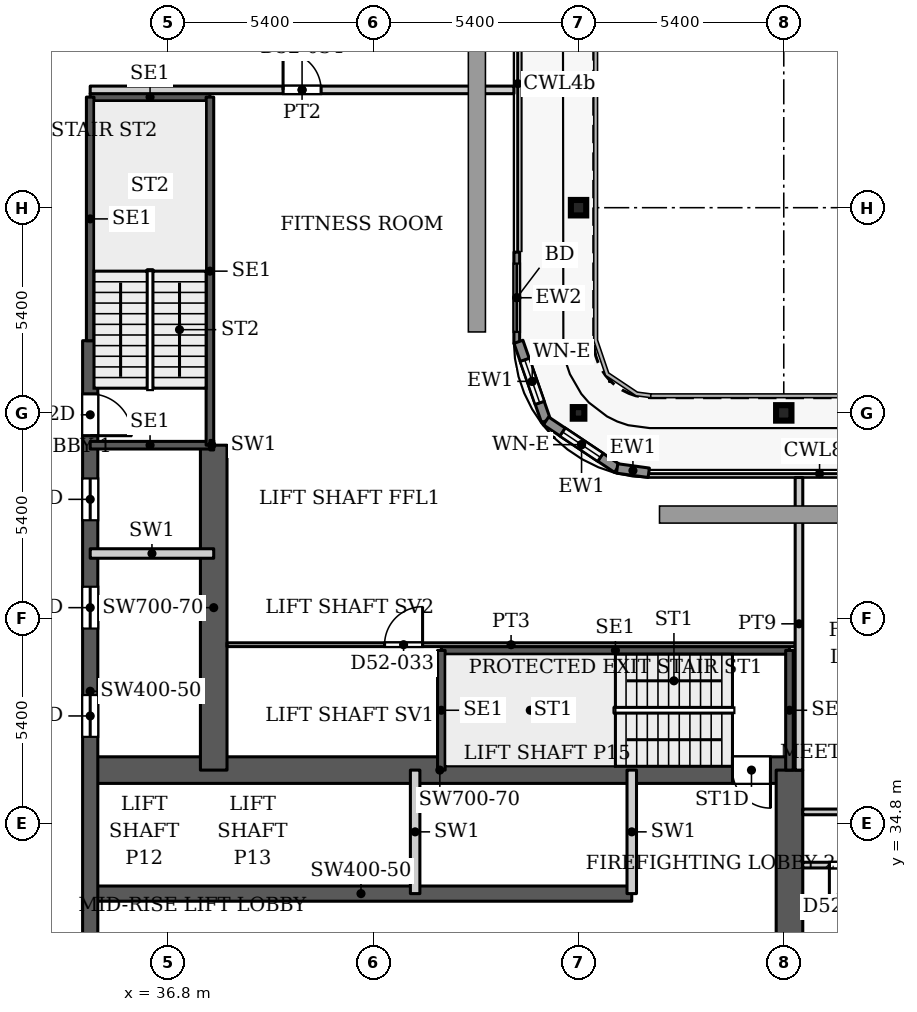
"""IFC4 building model, lengths in metres.
Left out: names, types, materials, properties, quantities, classifications, styles, units other than length and angle.
Written with IfcOpenShell. Run it as: python <this file> out.ifc"""

import sys

from ifc_helpers import new_model, si_unit, direction, frame, frame_2d, origin, origin_2d, place, context, subcontext, project, spatial, rectangle, hollow_rectangle, i_section, extrude, source, transform, mapped, element, fill, save


model = new_model("IFC4")
c1 = context("Model", 3, precision=1e-05, world=origin(), true_north=direction((0.0, 1.0)))
c2 = subcontext(c1, "Body", "Model", "MODEL_VIEW")
j1 = project(units=[si_unit("LENGTHUNIT", "METRE"), si_unit("PLANEANGLEUNIT", "RADIAN")], contexts=[c1])
p1 = place(None, origin())
s1 = spatial("IfcSite", under=j1, at=p1, CompositionType="ELEMENT")
p2 = place(p1, origin())
s2 = spatial("IfcBuilding", under=s1, at=p2, CompositionType="ELEMENT")
p3 = place(p2, frame((0.0, 0.0, 227.9)))
s3 = spatial("IfcBuildingStorey", under=s2, at=p3, CompositionType="ELEMENT", Elevation=227.9)
for number, where, z_axis, x_axis in (
    (1, (53.0, 45.6, 0.0), (0.0, 0.0, 1.0), (1.0, 0.0, 0.0)),
    (2, (47.6, 51.0, 0.0), (0.0, 0.0, 1.0), (1.0, 0.0, 0.0)),
):
    element("IfcColumn", number, at=place(p3, frame(where, z_axis=z_axis, x_axis=x_axis)), inside=s3, PredefinedType="COLUMN", context=c2, shape_type="SweptSolid", body=[
        extrude(i_section(OverallWidth=0.404, OverallDepth=0.407, WebThickness=0.027, FlangeThickness=0.044, FilletRadius=0.012, at=origin_2d()), origin(), (0.0, 0.0, 1.0), 3.9),
    ])
p4 = place(p3, frame((47.6, 45.6, 0.0), z_axis=(0.0, 0.0, 1.0), x_axis=(1.0, 0.0, 0.0)))
e3 = element("IfcColumn", 3, at=p4, inside=s3, PredefinedType="COLUMN", context=c2, shape_type="SweptSolid", body=[
    extrude(hollow_rectangle(XDim=0.305, YDim=0.305, WallThickness=0.016, InnerFilletRadius=0.016, OuterFilletRadius=0.032, at=origin_2d()), origin(), (0.0, 0.0, 1.0), 3.9),
])
p5 = place(p3, frame((34.75, 32.95, 0.0), z_axis=(0.0, 0.0, 1.0), x_axis=(1.0, 0.0, 0.0)))
e4 = element("IfcWall", 4, at=p5, inside=s3, PredefinedType="SHEAR", context=c2, shape_type="SweptSolid", body=[
    extrude(rectangle(XDim=14.25, YDim=0.4, at=frame_2d((7.125, 0.0))), origin(), (0.0, 0.0, 1.0), 3.9),
])
p6 = place(p3, frame((34.75, 36.2, 0.0), z_axis=(0.0, 0.0, 1.0), x_axis=(1.0, 0.0, 0.0)))
e5 = element("IfcWall", 5, at=p6, inside=s3, PredefinedType="SHEAR", context=c2, shape_type="SweptSolid", body=[
    extrude(rectangle(XDim=18.4, YDim=0.7, at=frame_2d((9.2, 0.0))), origin(), (0.0, 0.0, 1.0), 3.9),
])
p7 = place(p6, frame((16.9, 0.0, 0.0)))
e6 = element("IfcOpeningElement", 6, at=p7, cuts=e5, PredefinedType="OPENING", context=c2, shape_type="SweptSolid", body=[
    extrude(rectangle(XDim=1.0, YDim=2.2, at=frame_2d((0.5, 1.1))), frame((0.0, 0.36, 0.0), z_axis=(0.0, -1.0, 0.0), x_axis=(1.0, 0.0, 0.0)), (0.0, 0.0, 1.0), 0.72),
])
p8 = place(p3, frame((34.75, 29.05, 0.0), z_axis=(0.0, 0.0, 1.0), x_axis=(0.0, 1.0, 0.0)))
e7 = element("IfcWall", 7, at=p8, inside=s3, PredefinedType="SHEAR", context=c2, shape_type="SweptSolid", body=[
    extrude(rectangle(XDim=18.45, YDim=0.4, at=frame_2d((9.225, 0.0))), origin(), (0.0, 0.0, 1.0), 3.9),
])
p9 = place(p8, frame((8.025, 0.0, 0.0)))
e8 = element("IfcOpeningElement", 8, at=p9, cuts=e7, PredefinedType="OPENING", context=c2, shape_type="SweptSolid", body=[
    extrude(rectangle(XDim=1.1, YDim=2.2, at=frame_2d((0.55, 1.1))), frame((0.0, 0.21, 0.0), z_axis=(0.0, -1.0, 0.0), x_axis=(1.0, 0.0, 0.0)), (0.0, 0.0, 1.0), 0.42),
])
p10 = place(p8, frame((10.875, 0.0, 0.0)))
e9 = element("IfcOpeningElement", 9, at=p10, cuts=e7, PredefinedType="OPENING", context=c2, shape_type="SweptSolid", body=[
    extrude(rectangle(XDim=1.1, YDim=2.2, at=frame_2d((0.55, 1.1))), frame((0.0, 0.21, 0.0), z_axis=(0.0, -1.0, 0.0), x_axis=(1.0, 0.0, 0.0)), (0.0, 0.0, 1.0), 0.42),
])
p11 = place(p8, frame((13.725, 0.0, 0.0)))
e10 = element("IfcOpeningElement", 10, at=p11, cuts=e7, PredefinedType="OPENING", context=c2, shape_type="SweptSolid", body=[
    extrude(rectangle(XDim=1.1, YDim=2.2, at=frame_2d((0.55, 1.1))), frame((0.0, 0.21, 0.0), z_axis=(0.0, -1.0, 0.0), x_axis=(1.0, 0.0, 0.0)), (0.0, 0.0, 1.0), 0.42),
])
p12 = place(p8, frame((15.95, 0.0, 0.0)))
e11 = element("IfcOpeningElement", 11, at=p12, cuts=e7, PredefinedType="OPENING", context=c2, shape_type="SweptSolid", body=[
    extrude(rectangle(XDim=1.1, YDim=2.2, at=frame_2d((0.55, 1.1))), frame((0.0, 0.21, 0.0), z_axis=(0.0, -1.0, 0.0), x_axis=(1.0, 0.0, 0.0)), (0.0, 0.0, 1.0), 0.42),
])
p13 = place(p3, frame((38.0, 36.2, 0.0), z_axis=(0.0, 0.0, 1.0), x_axis=(0.0, 1.0, 0.0)))
e12 = element("IfcWall", 12, at=p13, inside=s3, PredefinedType="SHEAR", context=c2, shape_type="SweptSolid", body=[
    extrude(rectangle(XDim=8.55, YDim=0.7, at=frame_2d((4.275, 0.0))), origin(), (0.0, 0.0, 1.0), 3.9),
])
p14 = place(p3, frame((53.15, 25.8, 0.0), z_axis=(0.0, 0.0, 1.0), x_axis=(0.0, 1.0, 0.0)))
e13 = element("IfcWall", 13, at=p14, inside=s3, PredefinedType="SHEAR", context=c2, shape_type="SweptSolid", body=[
    extrude(rectangle(XDim=10.4, YDim=0.7, at=frame_2d((5.2, 0.0))), origin(), (0.0, 0.0, 1.0), 3.9),
])
p15 = place(p3, frame((45.975, 49.83, 0.0), z_axis=(0.0, 0.0, 1.0), x_axis=(0.0, -1.0, 0.0)))
e14 = element("IfcWall", 14, at=p15, inside=s3, PredefinedType="SOLIDWALL", context=c2, shape_type="SweptSolid", body=[
    extrude(rectangle(XDim=2.4, YDim=0.15, at=frame_2d((1.2, 0.0))), origin(), (0.0, 0.0, 1.0), 3.75),
])
p16 = place(p15, frame((0.3, 0.0, 0.0)))
e15 = element("IfcOpeningElement", 15, at=p16, cuts=e14, PredefinedType="OPENING", context=c2, shape_type="SweptSolid", body=[
    extrude(rectangle(XDim=1.8, YDim=2.4, at=frame_2d((0.9, 1.2))), frame((0.0, 0.085, 0.0), z_axis=(0.0, -1.0, 0.0), x_axis=(1.0, 0.0, 0.0)), (0.0, 0.0, 1.0), 0.17),
])
p17 = place(p3, frame((46.018, 47.471, 0.0), z_axis=(0.0, 0.0, 1.0), x_axis=(0.328791208903, -0.944402637093, 0.0)))
e16 = element("IfcWall", 16, at=p17, inside=s3, PredefinedType="SOLIDWALL", context=c2, shape_type="SweptSolid", body=[
    extrude(rectangle(XDim=2.205, YDim=0.25, at=frame_2d((1.102, 0.0))), origin(), (0.0, 0.0, 1.0), 3.75),
])
p18 = place(p17, frame((0.503, 0.0, 0.6)))
e17 = element("IfcOpeningElement", 17, at=p18, cuts=e16, PredefinedType="OPENING", context=c2, shape_type="SweptSolid", body=[
    extrude(rectangle(XDim=1.2, YDim=2.1, at=frame_2d((0.6, 1.05))), frame((0.0, 0.135, 0.0), z_axis=(0.0, -1.0, 0.0), x_axis=(1.0, 0.0, 0.0)), (0.0, 0.0, 1.0), 0.27),
])
p19 = place(p3, frame((46.743, 45.389, 0.0), z_axis=(0.0, 0.0, 1.0), x_axis=(0.831449265529, -0.555600682912, 0.0)))
e18 = element("IfcWall", 18, at=p19, inside=s3, PredefinedType="SOLIDWALL", context=c2, shape_type="SweptSolid", body=[
    extrude(rectangle(XDim=2.251, YDim=0.25, at=frame_2d((1.126, 0.0))), origin(), (0.0, 0.0, 1.0), 3.75),
])
p20 = place(p19, frame((0.525, 0.0, 0.6)))
e19 = element("IfcOpeningElement", 19, at=p20, cuts=e18, PredefinedType="OPENING", context=c2, shape_type="SweptSolid", body=[
    extrude(rectangle(XDim=1.2, YDim=2.1, at=frame_2d((0.6, 1.05))), frame((0.0, 0.135, 0.0), z_axis=(0.0, -1.0, 0.0), x_axis=(1.0, 0.0, 0.0)), (0.0, 0.0, 1.0), 0.27),
])
p21 = place(p3, frame((48.615, 44.138, 0.0), z_axis=(0.0, 0.0, 1.0), x_axis=(0.990741504246, -0.135761819977, 0.0)))
e20 = element("IfcWall", 20, at=p21, inside=s3, PredefinedType="SOLIDWALL", context=c2, shape_type="SweptSolid", body=[
    extrude(rectangle(XDim=0.84, YDim=0.25, at=frame_2d((0.42, 0.0))), origin(), (0.0, 0.0, 1.0), 3.75),
])
p22 = place(p3, frame((43.99, 39.35, 0.0), z_axis=(0.0, 0.0, 1.0), x_axis=(1.0, 0.0, 0.0)))
e21 = element("IfcWall", 21, at=p22, inside=s3, PredefinedType="SHEAR", context=c2, shape_type="SweptSolid", body=[
    extrude(rectangle(XDim=9.16, YDim=0.2, at=frame_2d((4.58, 0.0))), origin(), (0.0, 0.0, 1.0), 3.9),
])
for number, where, z_axis, x_axis in (
    (22, (43.99, 36.2, 0.0), (0.0, 0.0, 1.0), (0.0, 1.0, 0.0)),
    (23, (53.15, 36.2, 0.0), (0.0, 0.0, 1.0), (0.0, 1.0, 0.0)),
):
    element("IfcWall", number, at=place(p3, frame(where, z_axis=z_axis, x_axis=x_axis)), inside=s3, PredefinedType="SHEAR", context=c2, shape_type="SweptSolid", body=[
        extrude(rectangle(XDim=3.15, YDim=0.2, at=frame_2d((1.575, 0.0))), origin(), (0.0, 0.0, 1.0), 3.9),
    ])
for number, where, z_axis, x_axis in (
    (24, (34.75, 44.75, 0.0), (0.0, 0.0, 1.0), (1.0, 0.0, 0.0)),
    (25, (34.75, 53.91, 0.0), (0.0, 0.0, 1.0), (1.0, 0.0, 0.0)),
):
    element("IfcWall", number, at=place(p3, frame(where, z_axis=z_axis, x_axis=x_axis)), inside=s3, PredefinedType="SHEAR", context=c2, shape_type="SweptSolid", body=[
        extrude(rectangle(XDim=3.15, YDim=0.2, at=frame_2d((1.575, 0.0))), origin(), (0.0, 0.0, 1.0), 3.9),
    ])
p23 = place(p3, frame((34.75, 47.5, 0.0), z_axis=(0.0, 0.0, 1.0), x_axis=(0.0, 1.0, 0.0)))
e26 = element("IfcWall", 26, at=p23, inside=s3, PredefinedType="SHEAR", context=c2, shape_type="SweptSolid", body=[
    extrude(rectangle(XDim=6.41, YDim=0.2, at=frame_2d((3.205, 0.0))), origin(), (0.0, 0.0, 1.0), 3.9),
])
p24 = place(p3, frame((37.9, 44.75, 0.0), z_axis=(0.0, 0.0, 1.0), x_axis=(0.0, 1.0, 0.0)))
e27 = element("IfcWall", 27, at=p24, inside=s3, PredefinedType="SHEAR", context=c2, shape_type="SweptSolid", body=[
    extrude(rectangle(XDim=9.16, YDim=0.2, at=frame_2d((4.58, 0.0))), origin(), (0.0, 0.0, 1.0), 3.9),
])
for number, where, z_axis, x_axis in (
    (28, (43.3, 32.95, 0.0), (0.0, 0.0, 1.0), (0.0, 1.0, 0.0)),
    (29, (49.0, 32.95, 0.0), (0.0, 0.0, 1.0), (0.0, 1.0, 0.0)),
    (30, (34.75, 41.9, 0.0), (0.0, 0.0, 1.0), (1.0, 0.0, 0.0)),
):
    element("IfcWall", number, at=place(p3, frame(where, z_axis=z_axis, x_axis=x_axis)), inside=s3, PredefinedType="PARTITIONING", context=c2, shape_type="SweptSolid", body=[
        extrude(rectangle(XDim=3.25, YDim=0.25, at=frame_2d((1.625, 0.0))), origin(), (0.0, 0.0, 1.0), 3.9),
    ])
p25 = place(p3, frame((37.9, 44.75, 0.0), z_axis=(0.0, 0.0, 1.0), x_axis=(1.0, 0.0, 0.0)))
e31 = element("IfcWall", 31, at=p25, inside=s3, PredefinedType="PARTITIONING", context=c2, shape_type="SweptSolid", body=[
    extrude(rectangle(XDim=0.1, YDim=0.25, at=frame_2d((0.05, 0.0))), origin(), (0.0, 0.0, 1.0), 3.9),
])
p26 = place(p3, frame((34.75, 54.1, 0.0), z_axis=(0.0, 0.0, 1.0), x_axis=(1.0, 0.0, 0.0)))
e32 = element("IfcWall", 32, at=p26, inside=s3, PredefinedType="PARTITIONING", context=c2, shape_type="SweptSolid", body=[
    extrude(rectangle(XDim=11.15, YDim=0.2, at=frame_2d((5.575, 0.0))), origin(), (0.0, 0.0, 1.0), 3.6),
])
p27 = place(p26, frame((5.075, 0.0, 0.0)))
e33 = element("IfcOpeningElement", 33, at=p27, cuts=e32, PredefinedType="OPENING", context=c2, shape_type="SweptSolid", body=[
    extrude(rectangle(XDim=1.0, YDim=2.1, at=frame_2d((0.5, 1.05))), frame((0.0, 0.11, 0.0), z_axis=(0.0, -1.0, 0.0), x_axis=(1.0, 0.0, 0.0)), (0.0, 0.0, 1.0), 0.22),
])
p28 = place(p3, frame((38.349, 39.5, 0.0), z_axis=(0.0, 0.0, 1.0), x_axis=(1.0, 0.0, 0.0)))
e34 = element("IfcWall", 34, at=p28, inside=s3, PredefinedType="PARTITIONING", context=c2, shape_type="SweptSolid", body=[
    extrude(rectangle(XDim=14.951, YDim=0.1, at=frame_2d((7.476, 0.0))), origin(), (0.0, 0.0, 1.0), 3.6),
])
p29 = place(p28, frame((4.147, 0.0, 0.0)))
e35 = element("IfcOpeningElement", 35, at=p29, cuts=e34, PredefinedType="OPENING", context=c2, shape_type="SweptSolid", body=[
    extrude(rectangle(XDim=1.0, YDim=2.1, at=frame_2d((0.5, 1.05))), frame((0.0, 0.06, 0.0), z_axis=(0.0, -1.0, 0.0), x_axis=(1.0, 0.0, 0.0)), (0.0, 0.0, 1.0), 0.12),
])
p30 = place(p3, frame((53.4, 36.199, 0.0), z_axis=(0.0, 0.0, 1.0), x_axis=(0.0, 1.0, 0.0)))
e36 = element("IfcWall", 36, at=p30, inside=s3, PredefinedType="PARTITIONING", context=c2, shape_type="SweptSolid", body=[
    extrude(rectangle(XDim=7.701, YDim=0.2, at=frame_2d((3.851, 0.0))), origin(), (0.0, 0.0, 1.0), 3.6),
])
p31 = place(p3, frame((53.499, 33.7, 0.0), z_axis=(0.0, 0.0, 1.0), x_axis=(1.0, 0.0, 0.0)))
e37 = element("IfcWall", 37, at=p31, inside=s3, PredefinedType="PARTITIONING", context=c2, shape_type="SweptSolid", body=[
    extrude(rectangle(XDim=17.076, YDim=0.15, at=frame_2d((8.538, 0.0))), origin(), (0.0, 0.0, 1.0), 3.6),
])
p32 = place(p31, frame((10.151, 0.0, 0.0)))
e38 = element("IfcOpeningElement", 38, at=p32, cuts=e37, PredefinedType="OPENING", context=c2, shape_type="SweptSolid", body=[
    extrude(rectangle(XDim=0.8, YDim=2.1, at=frame_2d((0.4, 1.05))), frame((0.0, 0.085, 0.0), z_axis=(0.0, -1.0, 0.0), x_axis=(1.0, 0.0, 0.0)), (0.0, 0.0, 1.0), 0.17),
])
p33 = place(p31, frame((14.651, 0.0, 0.0)))
e39 = element("IfcOpeningElement", 39, at=p33, cuts=e37, PredefinedType="OPENING", context=c2, shape_type="SweptSolid", body=[
    extrude(rectangle(XDim=0.8, YDim=2.1, at=frame_2d((0.4, 1.05))), frame((0.0, 0.085, 0.0), z_axis=(0.0, -1.0, 0.0), x_axis=(1.0, 0.0, 0.0)), (0.0, 0.0, 1.0), 0.17),
])
p34 = place(p31, frame((7.451, 0.0, 0.0)))
e40 = element("IfcOpeningElement", 40, at=p34, cuts=e37, PredefinedType="OPENING", context=c2, shape_type="SweptSolid", body=[
    extrude(rectangle(XDim=0.8, YDim=2.1, at=frame_2d((0.4, 1.05))), frame((0.0, 0.085, 0.0), z_axis=(0.0, -1.0, 0.0), x_axis=(1.0, 0.0, 0.0)), (0.0, 0.0, 1.0), 0.17),
])
p35 = place(p31, frame((3.851, 0.0, 0.0)))
e41 = element("IfcOpeningElement", 41, at=p35, cuts=e37, PredefinedType="OPENING", context=c2, shape_type="SweptSolid", body=[
    extrude(rectangle(XDim=0.9, YDim=2.1, at=frame_2d((0.45, 1.05))), frame((0.0, 0.085, 0.0), z_axis=(0.0, -1.0, 0.0), x_axis=(1.0, 0.0, 0.0)), (0.0, 0.0, 1.0), 0.17),
])
p36 = place(p31, frame((0.701, 0.0, 0.0)))
e42 = element("IfcOpeningElement", 42, at=p36, cuts=e37, PredefinedType="OPENING", context=c2, shape_type="SweptSolid", body=[
    extrude(rectangle(XDim=0.8, YDim=2.1, at=frame_2d((0.4, 1.05))), frame((0.0, 0.085, 0.0), z_axis=(0.0, -1.0, 0.0), x_axis=(1.0, 0.0, 0.0)), (0.0, 0.0, 1.0), 0.17),
])
p37 = place(p31, frame((12.701, 0.0, 0.0)))
e43 = element("IfcOpeningElement", 43, at=p37, cuts=e37, PredefinedType="OPENING", context=c2, shape_type="SweptSolid", body=[
    extrude(rectangle(XDim=0.8, YDim=2.1, at=frame_2d((0.4, 1.05))), frame((0.0, 0.085, 0.0), z_axis=(0.0, -1.0, 0.0), x_axis=(1.0, 0.0, 0.0)), (0.0, 0.0, 1.0), 0.17),
])
p38 = place(p3, frame((53.499, 35.1, 0.0), z_axis=(0.0, 0.0, 1.0), x_axis=(1.0, 0.0, 0.0)))
e44 = element("IfcWall", 44, at=p38, inside=s3, PredefinedType="PARTITIONING", context=c2, shape_type="SweptSolid", body=[
    extrude(rectangle(XDim=19.901, YDim=0.15, at=frame_2d((9.95, 0.0))), origin(), (0.0, 0.0, 1.0), 3.6),
])
p39 = place(p38, frame((8.451, 0.0, 0.0)))
e45 = element("IfcOpeningElement", 45, at=p39, cuts=e44, PredefinedType="OPENING", context=c2, shape_type="SweptSolid", body=[
    extrude(rectangle(XDim=0.9, YDim=2.1, at=frame_2d((0.45, 1.05))), frame((0.0, 0.085, 0.0), z_axis=(0.0, -1.0, 0.0), x_axis=(1.0, 0.0, 0.0)), (0.0, 0.0, 1.0), 0.17),
])
p40 = place(p38, frame((11.601, 0.0, 0.0)))
e46 = element("IfcOpeningElement", 46, at=p40, cuts=e44, PredefinedType="OPENING", context=c2, shape_type="SweptSolid", body=[
    extrude(rectangle(XDim=0.9, YDim=2.1, at=frame_2d((0.45, 1.05))), frame((0.0, 0.085, 0.0), z_axis=(0.0, -1.0, 0.0), x_axis=(1.0, 0.0, 0.0)), (0.0, 0.0, 1.0), 0.17),
])
p41 = place(p38, frame((1.701, 0.0, 0.0)))
e47 = element("IfcOpeningElement", 47, at=p41, cuts=e44, PredefinedType="OPENING", context=c2, shape_type="SweptSolid", body=[
    extrude(rectangle(XDim=1.0, YDim=2.1, at=frame_2d((0.5, 1.05))), frame((0.0, 0.085, 0.0), z_axis=(0.0, -1.0, 0.0), x_axis=(1.0, 0.0, 0.0)), (0.0, 0.0, 1.0), 0.17),
])
p42 = place(p38, frame((4.801, 0.0, 0.0)))
e48 = element("IfcOpeningElement", 48, at=p42, cuts=e44, PredefinedType="OPENING", context=c2, shape_type="SweptSolid", body=[
    extrude(rectangle(XDim=1.6, YDim=2.1, at=frame_2d((0.8, 1.05))), frame((0.0, 0.085, 0.0), z_axis=(0.0, -1.0, 0.0), x_axis=(1.0, 0.0, 0.0)), (0.0, 0.0, 1.0), 0.17),
])
p43 = place(p38, frame((15.701, 0.0, 0.0)))
e49 = element("IfcOpeningElement", 49, at=p43, cuts=e44, PredefinedType="OPENING", context=c2, shape_type="SweptSolid", body=[
    extrude(rectangle(XDim=0.9, YDim=2.1, at=frame_2d((0.45, 1.05))), frame((0.0, 0.085, 0.0), z_axis=(0.0, -1.0, 0.0), x_axis=(1.0, 0.0, 0.0)), (0.0, 0.0, 1.0), 0.17),
])
m1 = source(origin(), c2, "Body", "SweptSolid", [
    extrude(rectangle(XDim=1.8, YDim=2.4, at=frame_2d((0.9, 1.2))), frame((0.0, 0.025, 0.0), z_axis=(0.0, -1.0, 0.0), x_axis=(1.0, 0.0, 0.0)), (0.0, 0.0, 1.0), 0.05),
])
p44 = place(p16, origin())
e50 = element("IfcDoor", 50, at=p44, inside=s3, OperationType="SLIDING_TO_LEFT", PredefinedType="DOOR", context=c2, shape_type="MappedRepresentation", body=[
    mapped(m1, transform((0.0, 0.0, 0.0), x_axis=(1.0, 0.0, 0.0), y_axis=(0.0, 1.0, 0.0), z_axis=(0.0, 0.0, 1.0), scale=1.0)),
])
fill(e15, e50)
m2 = source(origin(), c2, "Body", "SweptSolid", [
    extrude(rectangle(XDim=1.2, YDim=2.1, at=frame_2d((0.6, 1.05))), frame((0.0, 0.03, 0.0), z_axis=(0.0, -1.0, 0.0), x_axis=(1.0, 0.0, 0.0)), (0.0, 0.0, 1.0), 0.06),
])
p45 = place(p18, origin())
e51 = element("IfcWindow", 51, at=p45, inside=s3, PartitioningType="SINGLE_PANEL", PredefinedType="WINDOW", context=c2, shape_type="MappedRepresentation", body=[
    mapped(m2, transform((0.0, 0.0, 0.0), x_axis=(1.0, 0.0, 0.0), y_axis=(0.0, 1.0, 0.0), z_axis=(0.0, 0.0, 1.0), scale=1.0)),
])
fill(e17, e51)
p46 = place(p20, origin())
e52 = element("IfcWindow", 52, at=p46, inside=s3, PartitioningType="SINGLE_PANEL", PredefinedType="WINDOW", context=c2, shape_type="MappedRepresentation", body=[
    mapped(m2, transform((0.0, 0.0, 0.0), x_axis=(1.0, 0.0, 0.0), y_axis=(0.0, 1.0, 0.0), z_axis=(0.0, 0.0, 1.0), scale=1.0)),
])
fill(e19, e52)
m3 = source(origin(), c2, "Body", "SweptSolid", [
    extrude(rectangle(XDim=1.1, YDim=2.2, at=frame_2d((0.55, 1.1))), frame((0.0, 0.025, 0.0), z_axis=(0.0, -1.0, 0.0), x_axis=(1.0, 0.0, 0.0)), (0.0, 0.0, 1.0), 0.05),
])
p47 = place(p9, origin())
e53 = element("IfcDoor", 53, at=p47, inside=s3, OperationType="SLIDING_TO_LEFT", PredefinedType="DOOR", context=c2, shape_type="MappedRepresentation", body=[
    mapped(m3, transform((0.0, 0.0, 0.0), x_axis=(1.0, 0.0, 0.0), y_axis=(0.0, 1.0, 0.0), z_axis=(0.0, 0.0, 1.0), scale=1.0)),
])
fill(e8, e53)
p48 = place(p10, origin())
e54 = element("IfcDoor", 54, at=p48, inside=s3, OperationType="SLIDING_TO_LEFT", PredefinedType="DOOR", context=c2, shape_type="MappedRepresentation", body=[
    mapped(m3, transform((0.0, 0.0, 0.0), x_axis=(1.0, 0.0, 0.0), y_axis=(0.0, 1.0, 0.0), z_axis=(0.0, 0.0, 1.0), scale=1.0)),
])
fill(e9, e54)
p49 = place(p11, origin())
e55 = element("IfcDoor", 55, at=p49, inside=s3, OperationType="SLIDING_TO_LEFT", PredefinedType="DOOR", context=c2, shape_type="MappedRepresentation", body=[
    mapped(m3, transform((0.0, 0.0, 0.0), x_axis=(1.0, 0.0, 0.0), y_axis=(0.0, 1.0, 0.0), z_axis=(0.0, 0.0, 1.0), scale=1.0)),
])
fill(e10, e55)
m4 = source(origin(), c2, "Body", "SweptSolid", [
    extrude(rectangle(XDim=1.0, YDim=2.2, at=frame_2d((0.5, 1.1))), frame((0.0, 0.025, 0.0), z_axis=(0.0, -1.0, 0.0), x_axis=(1.0, 0.0, 0.0)), (0.0, 0.0, 1.0), 0.05),
])
p50 = place(p7, origin())
e56 = element("IfcDoor", 56, at=p50, inside=s3, OperationType="SINGLE_SWING_RIGHT", PredefinedType="DOOR", context=c2, shape_type="MappedRepresentation", body=[
    mapped(m4, transform((0.0, 0.0, 0.0), x_axis=(1.0, 0.0, 0.0), y_axis=(0.0, 1.0, 0.0), z_axis=(0.0, 0.0, 1.0), scale=1.0)),
])
fill(e6, e56)
m5 = source(origin(), c2, "Body", "SweptSolid", [
    extrude(rectangle(XDim=1.1, YDim=2.2, at=frame_2d((0.55, 1.1))), frame((0.0, 0.025, 0.0), z_axis=(0.0, -1.0, 0.0), x_axis=(1.0, 0.0, 0.0)), (0.0, 0.0, 1.0), 0.05),
])
p51 = place(p12, origin())
e57 = element("IfcDoor", 57, at=p51, inside=s3, OperationType="SINGLE_SWING_RIGHT", PredefinedType="DOOR", context=c2, shape_type="MappedRepresentation", body=[
    mapped(m5, transform((0.0, 0.0, 0.0), x_axis=(1.0, 0.0, 0.0), y_axis=(0.0, 1.0, 0.0), z_axis=(0.0, 0.0, 1.0), scale=1.0)),
])
fill(e11, e57)
m6 = source(origin(), c2, "Body", "SweptSolid", [
    extrude(rectangle(XDim=0.8, YDim=2.1, at=frame_2d((0.4, 1.05))), frame((0.0, 0.025, 0.0), z_axis=(0.0, -1.0, 0.0), x_axis=(1.0, 0.0, 0.0)), (0.0, 0.0, 1.0), 0.05),
])
p52 = place(p36, origin())
e58 = element("IfcDoor", 58, at=p52, inside=s3, OperationType="SINGLE_SWING_RIGHT", PredefinedType="DOOR", context=c2, shape_type="MappedRepresentation", body=[
    mapped(m6, transform((0.0, 0.0, 0.0), x_axis=(1.0, 0.0, 0.0), y_axis=(0.0, 1.0, 0.0), z_axis=(0.0, 0.0, 1.0), scale=1.0)),
])
fill(e42, e58)
m7 = source(origin(), c2, "Body", "SweptSolid", [
    extrude(rectangle(XDim=1.0, YDim=2.1, at=frame_2d((0.5, 1.05))), frame((0.0, 0.025, 0.0), z_axis=(0.0, -1.0, 0.0), x_axis=(1.0, 0.0, 0.0)), (0.0, 0.0, 1.0), 0.05),
])
p53 = place(p29, origin())
e59 = element("IfcDoor", 59, at=p53, inside=s3, OperationType="SINGLE_SWING_LEFT", PredefinedType="DOOR", context=c2, shape_type="MappedRepresentation", body=[
    mapped(m7, transform((0.0, 0.0, 0.0), x_axis=(1.0, 0.0, 0.0), y_axis=(0.0, 1.0, 0.0), z_axis=(0.0, 0.0, 1.0), scale=1.0)),
])
fill(e35, e59)
m8 = source(origin(), c2, "Body", "SweptSolid", [
    extrude(rectangle(XDim=1.0, YDim=2.1, at=frame_2d((0.5, 1.05))), frame((0.0, 0.025, 0.0), z_axis=(0.0, -1.0, 0.0), x_axis=(1.0, 0.0, 0.0)), (0.0, 0.0, 1.0), 0.05),
])
p54 = place(p27, origin())
e60 = element("IfcDoor", 60, at=p54, inside=s3, OperationType="SINGLE_SWING_LEFT", PredefinedType="DOOR", context=c2, shape_type="MappedRepresentation", body=[
    mapped(m8, transform((0.0, 0.0, 0.0), x_axis=(1.0, 0.0, 0.0), y_axis=(0.0, 1.0, 0.0), z_axis=(0.0, 0.0, 1.0), scale=1.0)),
])
fill(e33, e60)
save(model, sys.argv[1])
